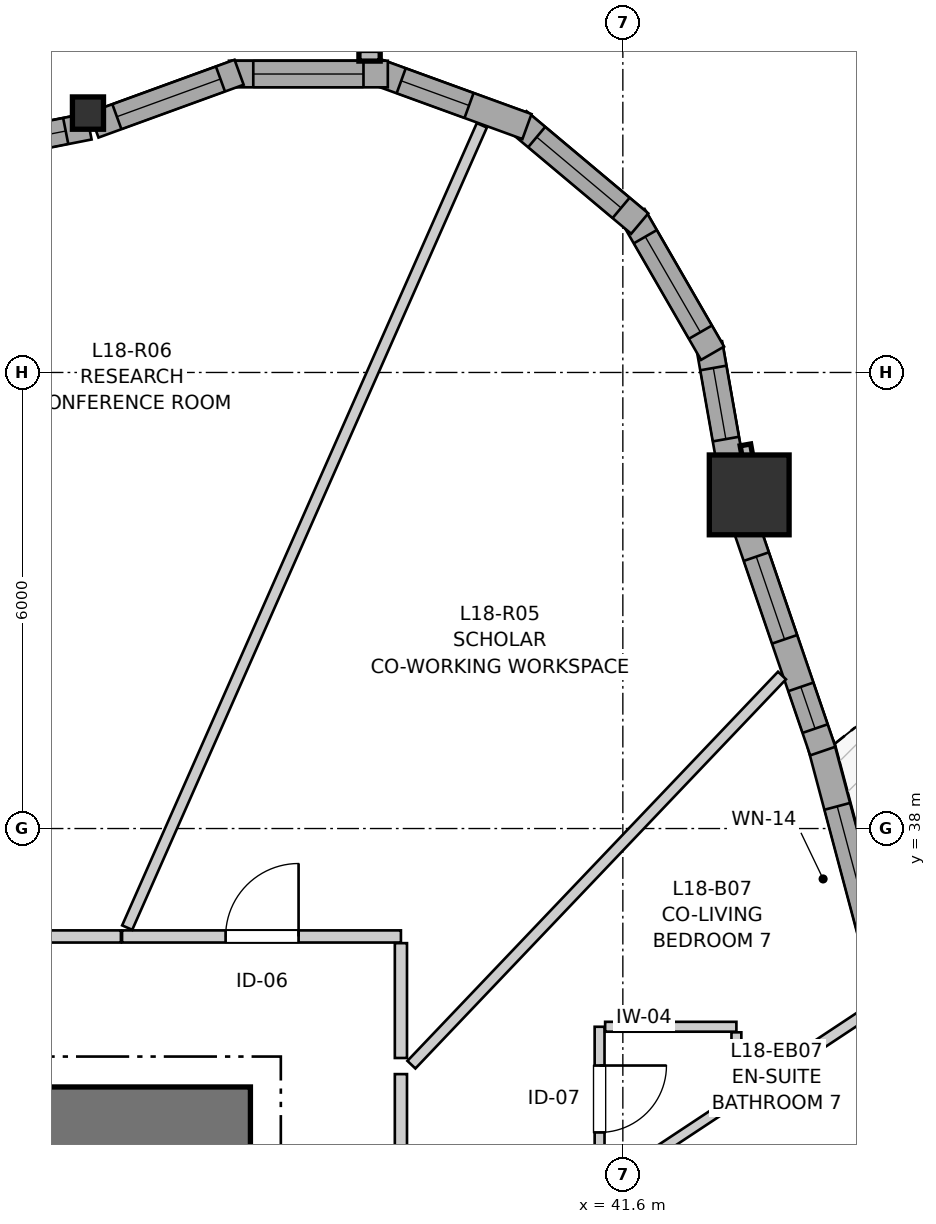
"""IFC4 building model, lengths in metres.
Left out: names, types, materials, properties, quantities, classifications, styles, units other than length and angle.
Written with IfcOpenShell. Run it as: python <this file> out.ifc"""

import sys

from ifc_helpers import new_model, si_unit, direction, frame, frame_2d, origin, origin_2d, place, context, subcontext, project, spatial, rectangle, i_section, extrude, source, transform, mapped, element, fill, save


model = new_model("IFC4")
c1 = context("Model", 3, precision=1e-05, world=origin(), true_north=direction((0.0, 1.0)))
c2 = subcontext(c1, "Body", "Model", "MODEL_VIEW")
j1 = project(units=[si_unit("LENGTHUNIT", "METRE"), si_unit("PLANEANGLEUNIT", "RADIAN")], contexts=[c1])
p1 = place(None, origin())
s1 = spatial("IfcSite", under=j1, at=p1, CompositionType="ELEMENT")
p2 = place(p1, origin())
s2 = spatial("IfcBuilding", under=s1, at=p2, CompositionType="ELEMENT")
p3 = place(p2, frame((0.0, 0.0, 62.2)))
s3 = spatial("IfcBuildingStorey", under=s2, at=p3, CompositionType="ELEMENT", Elevation=62.2)
p4 = place(p3, frame((36.7, 34.2, 0.0), z_axis=(0.0, 0.0, 1.0), x_axis=(-1.0, 0.0, 0.0)))
e1 = element("IfcWall", 1, at=p4, inside=s3, PredefinedType="SHEAR", context=c2, shape_type="SweptSolid", body=[
    extrude(rectangle(XDim=12.7, YDim=0.8, at=frame_2d((6.35, 0.0))), origin(), (0.0, 0.0, 1.0), 2.9),
])
m1 = source(origin(), c2, "Body", "SweptSolid", [
    extrude(rectangle(XDim=1.05, YDim=1.05, at=origin_2d()), origin(), (0.0, 0.0, 1.0), 2.9),
])
p5 = place(p3, frame((43.262, 42.389, 0.0), z_axis=(0.0, 0.0, 1.0), x_axis=(1.0, 0.0, 0.0)))
e2 = element("IfcColumn", 2, at=p5, inside=s3, PredefinedType="COLUMN", context=c2, shape_type="MappedRepresentation", body=[
    mapped(m1, transform((0.0, 0.0, 0.0), x_axis=(1.0, 0.0, 0.0), y_axis=(0.0, 1.0, 0.0), z_axis=(0.0, 0.0, 1.0), scale=1.0)),
])
m2 = source(origin(), c2, "Body", "SweptSolid", [
    extrude(i_section(OverallWidth=0.409, OverallDepth=0.425, WebThickness=0.03, FlangeThickness=0.048, FilletRadius=0.015, at=origin_2d()), origin(), (0.0, 0.0, 1.0), 2.9),
])
p6 = place(p3, frame((34.562, 47.413, 0.0), z_axis=(0.0, 0.0, 1.0), x_axis=(1.0, 0.0, 0.0)))
e3 = element("IfcColumn", 3, at=p6, inside=s3, PredefinedType="PILASTER", context=c2, shape_type="MappedRepresentation", body=[
    mapped(m2, transform((0.0, 0.0, 0.0), x_axis=(1.0, 0.0, 0.0), y_axis=(0.0, 1.0, 0.0), z_axis=(0.0, 0.0, 1.0), scale=1.0)),
])
p7 = place(p3, frame((45.081, 35.808, 0.0), z_axis=(0.0, 0.0, 1.0), x_axis=(-0.257114470429, 0.966380954436, 0.0)))
e4 = element("IfcWall", 4, at=p7, inside=s3, PredefinedType="SOLIDWALL", context=c2, shape_type="SweptSolid", body=[
    extrude(rectangle(XDim=3.41, YDim=0.35, at=frame_2d((1.705, 0.0))), origin(), (0.0, 0.0, 1.0), 2.38),
])
p8 = place(p7, frame((0.82, 0.0, 0.82)))
e5 = element("IfcOpeningElement", 5, at=p8, cuts=e4, PredefinedType="OPENING", context=c2, shape_type="SweptSolid", body=[
    extrude(rectangle(XDim=1.75, YDim=1.3, at=frame_2d((0.875, 0.65))), frame((0.0, 0.185, 0.0), z_axis=(0.0, -1.0, 0.0), x_axis=(1.0, 0.0, 0.0)), (0.0, 0.0, 1.0), 0.37),
])
p9 = place(p3, frame((44.23, 39.019, 0.0), z_axis=(0.0, 0.0, 1.0), x_axis=(-0.323560153501, 0.94620760252, 0.0)))
e6 = element("IfcWall", 6, at=p9, inside=s3, PredefinedType="SOLIDWALL", context=c2, shape_type="SweptSolid", body=[
    extrude(rectangle(XDim=3.202, YDim=0.35, at=frame_2d((1.601, 0.0))), origin(), (0.0, 0.0, 1.0), 2.38),
])
p10 = place(p9, frame((0.312, 0.0, 0.82)))
e7 = element("IfcOpeningElement", 7, at=p10, cuts=e6, PredefinedType="OPENING", context=c2, shape_type="SweptSolid", body=[
    extrude(rectangle(XDim=0.58, YDim=1.35, at=frame_2d((0.29, 0.675))), frame((0.0, 0.185, 0.0), z_axis=(0.0, -1.0, 0.0), x_axis=(1.0, 0.0, 0.0)), (0.0, 0.0, 1.0), 0.37),
])
p11 = place(p9, frame((1.554, 0.0, 0.82)))
e8 = element("IfcOpeningElement", 8, at=p11, cuts=e6, PredefinedType="OPENING", context=c2, shape_type="SweptSolid", body=[
    extrude(rectangle(XDim=1.15, YDim=1.2, at=frame_2d((0.575, 0.6))), frame((0.0, 0.185, 0.0), z_axis=(0.0, -1.0, 0.0), x_axis=(1.0, 0.0, 0.0)), (0.0, 0.0, 1.0), 0.37),
])
p12 = place(p3, frame((43.038, 42.655, 0.0), z_axis=(0.0, 0.0, 1.0), x_axis=(-0.173610462023, 0.984814402553, 0.0)))
e9 = element("IfcWall", 9, at=p12, inside=s3, PredefinedType="SOLIDWALL", context=c2, shape_type="SweptSolid", body=[
    extrude(rectangle(XDim=1.752, YDim=0.35, at=frame_2d((0.876, 0.0))), origin(), (0.0, 0.0, 1.0), 2.38),
])
p13 = place(p12, frame((0.476, 0.0, 0.82)))
e10 = element("IfcOpeningElement", 10, at=p13, cuts=e9, PredefinedType="OPENING", context=c2, shape_type="SweptSolid", body=[
    extrude(rectangle(XDim=0.95, YDim=1.35, at=frame_2d((0.475, 0.675))), frame((0.0, 0.185, 0.0), z_axis=(0.0, -1.0, 0.0), x_axis=(1.0, 0.0, 0.0)), (0.0, 0.0, 1.0), 0.37),
])
p14 = place(p3, frame((42.78, 44.253, 0.0), z_axis=(0.0, 0.0, 1.0), x_axis=(-0.49990781971, 0.866078617559, 0.0)))
e11 = element("IfcWall", 11, at=p14, inside=s3, PredefinedType="SOLIDWALL", context=c2, shape_type="SweptSolid", body=[
    extrude(rectangle(XDim=2.09, YDim=0.35, at=frame_2d((1.045, 0.0))), origin(), (0.0, 0.0, 1.0), 2.38),
])
p15 = place(p14, frame((0.32, 0.0, 0.82)))
e12 = element("IfcOpeningElement", 12, at=p15, cuts=e11, PredefinedType="OPENING", context=c2, shape_type="SweptSolid", body=[
    extrude(rectangle(XDim=1.45, YDim=1.25, at=frame_2d((0.725, 0.625))), frame((0.0, 0.185, 0.0), z_axis=(0.0, -1.0, 0.0), x_axis=(1.0, 0.0, 0.0)), (0.0, 0.0, 1.0), 0.37),
])
p16 = place(p3, frame((41.822, 45.959, 0.0), z_axis=(0.0, 0.0, 1.0), x_axis=(-0.766024572719, 0.642811289563, 0.0)))
e13 = element("IfcWall", 13, at=p16, inside=s3, PredefinedType="SOLIDWALL", context=c2, shape_type="SweptSolid", body=[
    extrude(rectangle(XDim=2.09, YDim=0.35, at=frame_2d((1.045, 0.0))), origin(), (0.0, 0.0, 1.0), 2.38),
])
p17 = place(p16, frame((0.32, 0.0, 0.82)))
e14 = element("IfcOpeningElement", 14, at=p17, cuts=e13, PredefinedType="OPENING", context=c2, shape_type="SweptSolid", body=[
    extrude(rectangle(XDim=1.45, YDim=1.25, at=frame_2d((0.725, 0.625))), frame((0.0, 0.185, 0.0), z_axis=(0.0, -1.0, 0.0), x_axis=(1.0, 0.0, 0.0)), (0.0, 0.0, 1.0), 0.37),
])
p18 = place(p3, frame((40.338, 47.235, 0.0), z_axis=(0.0, 0.0, 1.0), x_axis=(-0.939711556618, 0.341968113072, 0.0)))
e15 = element("IfcWall", 15, at=p18, inside=s3, PredefinedType="SOLIDWALL", context=c2, shape_type="SweptSolid", body=[
    extrude(rectangle(XDim=2.09, YDim=0.35, at=frame_2d((1.045, 0.0))), origin(), (0.0, 0.0, 1.0), 2.38),
])
p19 = place(p18, frame((0.811, 0.0, 0.82)))
e16 = element("IfcOpeningElement", 16, at=p19, cuts=e15, PredefinedType="OPENING", context=c2, shape_type="SweptSolid", body=[
    extrude(rectangle(XDim=0.95, YDim=1.35, at=frame_2d((0.475, 0.675))), frame((0.0, 0.185, 0.0), z_axis=(0.0, -1.0, 0.0), x_axis=(1.0, 0.0, 0.0)), (0.0, 0.0, 1.0), 0.37),
])
p20 = place(p3, frame((38.508, 47.927, 0.0), z_axis=(0.0, 0.0, 1.0), x_axis=(-1.0, 0.0, 0.0)))
e17 = element("IfcWall", 17, at=p20, inside=s3, PredefinedType="SOLIDWALL", context=c2, shape_type="SweptSolid", body=[
    extrude(rectangle(XDim=2.091, YDim=0.35, at=frame_2d((1.045, 0.0))), origin(), (0.0, 0.0, 1.0), 2.38),
])
p21 = place(p20, frame((0.32, 0.0, 0.82)))
e18 = element("IfcOpeningElement", 18, at=p21, cuts=e17, PredefinedType="OPENING", context=c2, shape_type="SweptSolid", body=[
    extrude(rectangle(XDim=1.45, YDim=1.25, at=frame_2d((0.725, 0.625))), frame((0.0, 0.185, 0.0), z_axis=(0.0, -1.0, 0.0), x_axis=(1.0, 0.0, 0.0)), (0.0, 0.0, 1.0), 0.37),
])
p22 = place(p3, frame((36.551, 47.95, 0.0), z_axis=(0.0, 0.0, 1.0), x_axis=(-0.939691662178, -0.342022777067, 0.0)))
e19 = element("IfcWall", 19, at=p22, inside=s3, PredefinedType="SOLIDWALL", context=c2, shape_type="SweptSolid", body=[
    extrude(rectangle(XDim=2.032, YDim=0.35, at=frame_2d((1.016, 0.0))), origin(), (0.0, 0.0, 1.0), 2.38),
])
p23 = place(p22, frame((0.261, 0.0, 0.82)))
e20 = element("IfcOpeningElement", 20, at=p23, cuts=e19, PredefinedType="OPENING", context=c2, shape_type="SweptSolid", body=[
    extrude(rectangle(XDim=1.45, YDim=1.25, at=frame_2d((0.725, 0.625))), frame((0.0, 0.185, 0.0), z_axis=(0.0, -1.0, 0.0), x_axis=(1.0, 0.0, 0.0)), (0.0, 0.0, 1.0), 0.37),
])
p24 = place(p3, frame((34.577, 47.237, 0.0), z_axis=(0.0, 0.0, 1.0), x_axis=(-0.981238400755, -0.192798342532, 0.0)))
e21 = element("IfcWall", 21, at=p24, inside=s3, PredefinedType="SOLIDWALL", context=c2, shape_type="SweptSolid", body=[
    extrude(rectangle(XDim=3.482, YDim=0.35, at=frame_2d((1.741, 0.0))), origin(), (0.0, 0.0, 1.0), 2.38),
])
p25 = place(p24, frame((0.313, 0.0, 0.82)))
e22 = element("IfcOpeningElement", 22, at=p25, cuts=e21, PredefinedType="OPENING", context=c2, shape_type="SweptSolid", body=[
    extrude(rectangle(XDim=1.45, YDim=1.25, at=frame_2d((0.725, 0.625))), frame((0.0, 0.185, 0.0), z_axis=(0.0, -1.0, 0.0), x_axis=(1.0, 0.0, 0.0)), (0.0, 0.0, 1.0), 0.37),
])
p26 = place(p24, frame((2.234, 0.0, 0.82)))
e23 = element("IfcOpeningElement", 23, at=p26, cuts=e21, PredefinedType="OPENING", context=c2, shape_type="SweptSolid", body=[
    extrude(rectangle(XDim=0.95, YDim=1.35, at=frame_2d((0.475, 0.675))), frame((0.0, 0.185, 0.0), z_axis=(0.0, -1.0, 0.0), x_axis=(1.0, 0.0, 0.0)), (0.0, 0.0, 1.0), 0.37),
])
p27 = place(p3, frame((35.011, 36.58, 0.0), z_axis=(0.0, 0.0, 1.0), x_axis=(1.0, 0.0, 0.0)))
e24 = element("IfcWall", 24, at=p27, inside=s3, PredefinedType="PARTITIONING", context=c2, shape_type="SweptSolid", body=[
    extrude(rectangle(XDim=3.669, YDim=0.16, at=frame_2d((1.834, 0.0))), origin(), (0.0, 0.0, 1.0), 2.9),
])
p28 = place(p27, frame((1.363, 0.0, 0.0)))
e25 = element("IfcOpeningElement", 25, at=p28, cuts=e24, PredefinedType="OPENING", context=c2, shape_type="SweptSolid", body=[
    extrude(rectangle(XDim=0.96, YDim=2.1, at=frame_2d((0.48, 1.05))), frame((0.0, 0.09, 0.0), z_axis=(0.0, -1.0, 0.0), x_axis=(1.0, 0.0, 0.0)), (0.0, 0.0, 1.0), 0.18),
])
p29 = place(p3, frame((31.546, 36.58, 0.0), z_axis=(0.0, 0.0, 1.0), x_axis=(1.0, 0.0, 0.0)))
e26 = element("IfcWall", 26, at=p29, inside=s3, PredefinedType="PARTITIONING", context=c2, shape_type="SweptSolid", body=[
    extrude(rectangle(XDim=3.45, YDim=0.16, at=frame_2d((1.725, 0.0))), origin(), (0.0, 0.0, 1.0), 2.9),
])
p30 = place(p29, frame((1.075, 0.0, 0.0)))
e27 = element("IfcOpeningElement", 27, at=p30, cuts=e26, PredefinedType="OPENING", context=c2, shape_type="SweptSolid", body=[
    extrude(rectangle(XDim=1.3, YDim=2.1, at=frame_2d((0.65, 1.05))), frame((0.0, 0.09, 0.0), z_axis=(0.0, -1.0, 0.0), x_axis=(1.0, 0.0, 0.0)), (0.0, 0.0, 1.0), 0.18),
])
p31 = place(p3, frame((38.68, 34.769, 0.0), z_axis=(0.0, 0.0, 1.0), x_axis=(0.0, -1.0, 0.0)))
e28 = element("IfcWall", 28, at=p31, inside=s3, PredefinedType="PARTITIONING", context=c2, shape_type="SweptSolid", body=[
    extrude(rectangle(XDim=3.271, YDim=0.16, at=frame_2d((1.635, 0.0))), origin(), (0.0, 0.0, 1.0), 2.9),
])
p32 = place(p31, frame((1.177, 0.0, 0.0)))
e29 = element("IfcOpeningElement", 29, at=p32, cuts=e28, PredefinedType="OPENING", context=c2, shape_type="SweptSolid", body=[
    extrude(rectangle(XDim=0.92, YDim=2.1, at=frame_2d((0.46, 1.05))), frame((0.0, 0.09, 0.0), z_axis=(0.0, -1.0, 0.0), x_axis=(1.0, 0.0, 0.0)), (0.0, 0.0, 1.0), 0.18),
])
p33 = place(p3, frame((41.294, 35.392, 0.0), z_axis=(0.0, 0.0, 1.0), x_axis=(0.0, -1.0, 0.0)))
e30 = element("IfcWall", 30, at=p33, inside=s3, PredefinedType="PARTITIONING", context=c2, shape_type="SweptSolid", body=[
    extrude(rectangle(XDim=1.9, YDim=0.13, at=frame_2d((0.95, 0.0))), origin(), (0.0, 0.0, 1.0), 2.9),
])
p34 = place(p33, frame((0.51, 0.0, 0.0)))
e31 = element("IfcOpeningElement", 31, at=p34, cuts=e30, PredefinedType="OPENING", context=c2, shape_type="SweptSolid", body=[
    extrude(rectangle(XDim=0.88, YDim=2.05, at=frame_2d((0.44, 1.025))), frame((0.0, 0.075, 0.0), z_axis=(0.0, -1.0, 0.0), x_axis=(1.0, 0.0, 0.0)), (0.0, 0.0, 1.0), 0.15),
])
p35 = place(p3, frame((35.079, 36.697, 0.0), z_axis=(0.0, 0.0, 1.0), x_axis=(0.404349483928, 0.914604556542, 0.0)))
e32 = element("IfcWall", 32, at=p35, inside=s3, PredefinedType="PARTITIONING", context=c2, shape_type="SweptSolid", body=[
    extrude(rectangle(XDim=11.54, YDim=0.145, at=frame_2d((5.77, 0.0))), origin(), (0.0, 0.0, 1.0), 2.9),
])
p36 = place(p3, frame((38.818, 34.893, 0.0), z_axis=(0.0, 0.0, 1.0), x_axis=(0.68961378572, 0.724177344678, 0.0)))
e33 = element("IfcWall", 33, at=p36, inside=s3, PredefinedType="PARTITIONING", context=c2, shape_type="SweptSolid", body=[
    extrude(rectangle(XDim=7.071, YDim=0.145, at=frame_2d((3.535, 0.0))), origin(), (0.0, 0.0, 1.0), 2.9),
])
p37 = place(p3, frame((43.094, 34.439, 0.0), z_axis=(0.0, 0.0, 1.0), x_axis=(0.833690342454, 0.552232209219, 0.0)))
e34 = element("IfcWall", 34, at=p37, inside=s3, PredefinedType="PARTITIONING", context=c2, shape_type="SweptSolid", body=[
    extrude(rectangle(XDim=2.194, YDim=0.145, at=frame_2d((1.097, 0.0))), origin(), (0.0, 0.0, 1.0), 2.9),
])
p38 = place(p3, frame((41.367, 35.392, 0.0), z_axis=(0.0, 0.0, 1.0), x_axis=(1.0, 0.0, 0.0)))
e35 = element("IfcWall", 35, at=p38, inside=s3, PredefinedType="PARTITIONING", context=c2, shape_type="SweptSolid", body=[
    extrude(rectangle(XDim=1.727, YDim=0.13, at=frame_2d((0.864, 0.0))), origin(), (0.0, 0.0, 1.0), 2.9),
])
p39 = place(p3, frame((38.68, 34.981, 0.0), z_axis=(0.0, 0.0, 1.0), x_axis=(0.0, 1.0, 0.0)))
e36 = element("IfcWall", 36, at=p39, inside=s3, PredefinedType="PARTITIONING", context=c2, shape_type="SweptSolid", body=[
    extrude(rectangle(XDim=1.511, YDim=0.16, at=frame_2d((0.755, 0.0))), origin(), (0.0, 0.0, 1.0), 2.9),
])
p40 = place(p3, frame((41.676, 33.5, 0.0), z_axis=(0.0, 0.0, 1.0), x_axis=(0.833939065936, 0.55185653417, 0.0)))
e37 = element("IfcWall", 37, at=p40, inside=s3, PredefinedType="PARTITIONING", context=c2, shape_type="SweptSolid", body=[
    extrude(rectangle(XDim=1.686, YDim=0.13, at=frame_2d((0.843, 0.0))), origin(), (0.0, 0.0, 1.0), 2.9),
])
p41 = place(p3, frame((43.094, 34.577, 0.0), z_axis=(0.0, 0.0, 1.0), x_axis=(0.0, 1.0, 0.0)))
e38 = element("IfcWall", 38, at=p41, inside=s3, PredefinedType="PARTITIONING", context=c2, shape_type="SweptSolid", body=[
    extrude(rectangle(XDim=0.742, YDim=0.13, at=frame_2d((0.371, 0.0))), origin(), (0.0, 0.0, 1.0), 2.9),
])
m3 = source(origin(), c2, "Body", "SweptSolid", [
    extrude(rectangle(XDim=1.75, YDim=1.3, at=frame_2d((0.875, 0.65))), frame((0.0, 0.03, 0.0), z_axis=(0.0, -1.0, 0.0), x_axis=(1.0, 0.0, 0.0)), (0.0, 0.0, 1.0), 0.06),
])
p42 = place(p8, origin())
e39 = element("IfcWindow", 39, at=p42, inside=s3, PartitioningType="SINGLE_PANEL", PredefinedType="WINDOW", context=c2, shape_type="MappedRepresentation", body=[
    mapped(m3, transform((0.0, 0.0, 0.0), x_axis=(1.0, 0.0, 0.0), y_axis=(0.0, 1.0, 0.0), z_axis=(0.0, 0.0, 1.0), scale=1.0)),
])
fill(e5, e39)
m4 = source(origin(), c2, "Body", "SweptSolid", [
    extrude(rectangle(XDim=0.58, YDim=1.35, at=frame_2d((0.29, 0.675))), frame((0.0, 0.03, 0.0), z_axis=(0.0, -1.0, 0.0), x_axis=(1.0, 0.0, 0.0)), (0.0, 0.0, 1.0), 0.06),
])
p43 = place(p10, origin())
e40 = element("IfcWindow", 40, at=p43, inside=s3, PartitioningType="SINGLE_PANEL", PredefinedType="WINDOW", context=c2, shape_type="MappedRepresentation", body=[
    mapped(m4, transform((0.0, 0.0, 0.0), x_axis=(1.0, 0.0, 0.0), y_axis=(0.0, 1.0, 0.0), z_axis=(0.0, 0.0, 1.0), scale=1.0)),
])
fill(e7, e40)
m5 = source(origin(), c2, "Body", "SweptSolid", [
    extrude(rectangle(XDim=1.15, YDim=1.2, at=frame_2d((0.575, 0.6))), frame((0.0, 0.03, 0.0), z_axis=(0.0, -1.0, 0.0), x_axis=(1.0, 0.0, 0.0)), (0.0, 0.0, 1.0), 0.06),
])
p44 = place(p11, origin())
e41 = element("IfcWindow", 41, at=p44, inside=s3, PartitioningType="SINGLE_PANEL", PredefinedType="WINDOW", context=c2, shape_type="MappedRepresentation", body=[
    mapped(m5, transform((0.0, 0.0, 0.0), x_axis=(1.0, 0.0, 0.0), y_axis=(0.0, 1.0, 0.0), z_axis=(0.0, 0.0, 1.0), scale=1.0)),
])
fill(e8, e41)
m6 = source(origin(), c2, "Body", "SweptSolid", [
    extrude(rectangle(XDim=0.95, YDim=1.35, at=frame_2d((0.475, 0.675))), frame((0.0, 0.03, 0.0), z_axis=(0.0, -1.0, 0.0), x_axis=(1.0, 0.0, 0.0)), (0.0, 0.0, 1.0), 0.06),
])
p45 = place(p13, origin())
e42 = element("IfcWindow", 42, at=p45, inside=s3, PartitioningType="SINGLE_PANEL", PredefinedType="WINDOW", context=c2, shape_type="MappedRepresentation", body=[
    mapped(m6, transform((0.0, 0.0, 0.0), x_axis=(1.0, 0.0, 0.0), y_axis=(0.0, 1.0, 0.0), z_axis=(0.0, 0.0, 1.0), scale=1.0)),
])
fill(e10, e42)
m7 = source(origin(), c2, "Body", "SweptSolid", [
    extrude(rectangle(XDim=1.45, YDim=1.25, at=frame_2d((0.725, 0.625))), frame((0.0, 0.03, 0.0), z_axis=(0.0, -1.0, 0.0), x_axis=(1.0, 0.0, 0.0)), (0.0, 0.0, 1.0), 0.06),
])
p46 = place(p15, origin())
e43 = element("IfcWindow", 43, at=p46, inside=s3, PartitioningType="SINGLE_PANEL", PredefinedType="WINDOW", context=c2, shape_type="MappedRepresentation", body=[
    mapped(m7, transform((0.0, 0.0, 0.0), x_axis=(1.0, 0.0, 0.0), y_axis=(0.0, 1.0, 0.0), z_axis=(0.0, 0.0, 1.0), scale=1.0)),
])
fill(e12, e43)
p47 = place(p17, origin())
e44 = element("IfcWindow", 44, at=p47, inside=s3, PartitioningType="SINGLE_PANEL", PredefinedType="WINDOW", context=c2, shape_type="MappedRepresentation", body=[
    mapped(m7, transform((0.0, 0.0, 0.0), x_axis=(1.0, 0.0, 0.0), y_axis=(0.0, 1.0, 0.0), z_axis=(0.0, 0.0, 1.0), scale=1.0)),
])
fill(e14, e44)
p48 = place(p19, origin())
e45 = element("IfcWindow", 45, at=p48, inside=s3, PartitioningType="SINGLE_PANEL", PredefinedType="WINDOW", context=c2, shape_type="MappedRepresentation", body=[
    mapped(m6, transform((0.0, 0.0, 0.0), x_axis=(1.0, 0.0, 0.0), y_axis=(0.0, 1.0, 0.0), z_axis=(0.0, 0.0, 1.0), scale=1.0)),
])
fill(e16, e45)
p49 = place(p21, origin())
e46 = element("IfcWindow", 46, at=p49, inside=s3, PartitioningType="SINGLE_PANEL", PredefinedType="WINDOW", context=c2, shape_type="MappedRepresentation", body=[
    mapped(m7, transform((0.0, 0.0, 0.0), x_axis=(1.0, 0.0, 0.0), y_axis=(0.0, 1.0, 0.0), z_axis=(0.0, 0.0, 1.0), scale=1.0)),
])
fill(e18, e46)
p50 = place(p23, origin())
e47 = element("IfcWindow", 47, at=p50, inside=s3, PartitioningType="SINGLE_PANEL", PredefinedType="WINDOW", context=c2, shape_type="MappedRepresentation", body=[
    mapped(m7, transform((0.0, 0.0, 0.0), x_axis=(1.0, 0.0, 0.0), y_axis=(0.0, 1.0, 0.0), z_axis=(0.0, 0.0, 1.0), scale=1.0)),
])
fill(e20, e47)
p51 = place(p25, origin())
e48 = element("IfcWindow", 48, at=p51, inside=s3, PartitioningType="SINGLE_PANEL", PredefinedType="WINDOW", context=c2, shape_type="MappedRepresentation", body=[
    mapped(m7, transform((0.0, 0.0, 0.0), x_axis=(1.0, 0.0, 0.0), y_axis=(0.0, 1.0, 0.0), z_axis=(0.0, 0.0, 1.0), scale=1.0)),
])
fill(e22, e48)
m8 = source(origin(), c2, "Body", "SweptSolid", [
    extrude(rectangle(XDim=0.96, YDim=2.1, at=frame_2d((0.48, 1.05))), frame((0.0, 0.025, 0.0), z_axis=(0.0, -1.0, 0.0), x_axis=(1.0, 0.0, 0.0)), (0.0, 0.0, 1.0), 0.05),
])
p52 = place(p28, origin())
e49 = element("IfcDoor", 49, at=p52, inside=s3, OperationType="SINGLE_SWING_RIGHT", PredefinedType="DOOR", context=c2, shape_type="MappedRepresentation", body=[
    mapped(m8, transform((0.0, 0.0, 0.0), x_axis=(1.0, 0.0, 0.0), y_axis=(0.0, 1.0, 0.0), z_axis=(0.0, 0.0, 1.0), scale=1.0)),
])
fill(e25, e49)
m9 = source(origin(), c2, "Body", "SweptSolid", [
    extrude(rectangle(XDim=0.88, YDim=2.05, at=frame_2d((0.44, 1.025))), frame((0.0, 0.025, 0.0), z_axis=(0.0, -1.0, 0.0), x_axis=(1.0, 0.0, 0.0)), (0.0, 0.0, 1.0), 0.05),
])
p53 = place(p34, origin())
e50 = element("IfcDoor", 50, at=p53, inside=s3, OperationType="SINGLE_SWING_LEFT", PredefinedType="DOOR", context=c2, shape_type="MappedRepresentation", body=[
    mapped(m9, transform((0.0, 0.0, 0.0), x_axis=(1.0, 0.0, 0.0), y_axis=(0.0, 1.0, 0.0), z_axis=(0.0, 0.0, 1.0), scale=1.0)),
])
fill(e31, e50)
save(model, sys.argv[1])
